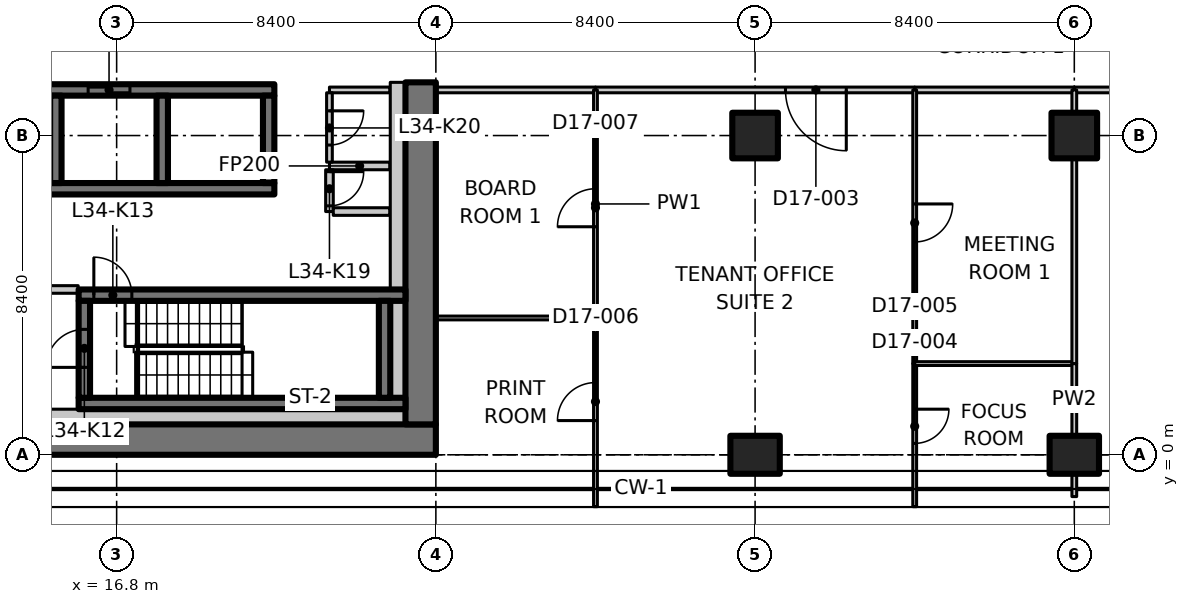
"""IFC4 building model, lengths in metres.
Left out: names, types, materials, properties, quantities, classifications, styles, units other than length and angle.
Written with IfcOpenShell. Run it as: python <this file> out.ifc"""

import sys

from ifc_helpers import new_model, si_unit, direction, frame, frame_2d, origin, origin_2d, place, context, subcontext, project, spatial, polyline, rectangle, outline, extrude, element, fill, save


model = new_model("IFC4")
c1 = context("Model", 3, precision=1e-05, world=origin(), true_north=direction((0.0, 1.0)))
c2 = subcontext(c1, "Body", "Model", "MODEL_VIEW")
j1 = project(units=[si_unit("LENGTHUNIT", "METRE"), si_unit("PLANEANGLEUNIT", "RADIAN")], contexts=[c1])
p1 = place(None, origin())
s1 = spatial("IfcSite", under=j1, at=p1, CompositionType="ELEMENT")
p2 = place(p1, origin())
s2 = spatial("IfcBuilding", under=s1, at=p2, CompositionType="ELEMENT")
p3 = place(p2, frame((0.0, 0.0, 138.5)))
s3 = spatial("IfcBuildingStorey", under=s2, at=p3, CompositionType="ELEMENT", Elevation=138.5)
p4 = place(p3, frame((33.6, 0.0, 0.0), z_axis=(0.0, 0.0, 1.0), x_axis=(0.0, 1.0, 0.0)))
e1 = element("IfcColumn", 1, at=p4, inside=s3, PredefinedType="COLUMN", context=c2, shape_type="SweptSolid", body=[
    extrude(rectangle(XDim=1.0, YDim=1.3, at=origin_2d()), origin(), (0.0, 0.0, 1.0), 3.35),
])
p5 = place(p3, frame((33.6, 8.4, 0.0), z_axis=(0.0, 0.0, 1.0), x_axis=(1.0, 0.0, 0.0)))
e2 = element("IfcColumn", 2, at=p5, inside=s3, PredefinedType="COLUMN", context=c2, shape_type="SweptSolid", body=[
    extrude(rectangle(XDim=1.2, YDim=1.2, at=origin_2d()), origin(), (0.0, 0.0, 1.0), 3.35),
])
p6 = place(p3, frame((42.0, 0.0, 0.0), z_axis=(0.0, 0.0, 1.0), x_axis=(0.0, 1.0, 0.0)))
e3 = element("IfcColumn", 3, at=p6, inside=s3, PredefinedType="COLUMN", context=c2, shape_type="SweptSolid", body=[
    extrude(rectangle(XDim=1.0, YDim=1.3, at=origin_2d()), origin(), (0.0, 0.0, 1.0), 3.35),
])
p7 = place(p3, frame((42.0, 8.4, 0.0), z_axis=(0.0, 0.0, 1.0), x_axis=(1.0, 0.0, 0.0)))
e4 = element("IfcColumn", 4, at=p7, inside=s3, PredefinedType="COLUMN", context=c2, shape_type="SweptSolid", body=[
    extrude(rectangle(XDim=1.2, YDim=1.2, at=origin_2d()), origin(), (0.0, 0.0, 1.0), 3.35),
])
p8 = place(p3, frame((7.136, 0.4, 0.0), z_axis=(0.0, 0.0, 1.0), x_axis=(1.0, 0.0, 0.0)))
e5 = element("IfcWall", 5, at=p8, inside=s3, PredefinedType="SHEAR", context=c2, shape_type="SweptSolid", body=[
    extrude(rectangle(XDim=18.063, YDim=0.8, at=frame_2d((9.032, 0.0))), origin(), (0.0, 0.0, 1.0), 3.35),
])
p9 = place(p3, frame((24.8, 0.8, 0.0), z_axis=(0.0, 0.0, 1.0), x_axis=(0.0, 1.0, 0.0)))
e6 = element("IfcWall", 6, at=p9, inside=s3, PredefinedType="SHEAR", context=c2, shape_type="SweptSolid", body=[
    extrude(rectangle(XDim=9.0, YDim=0.8, at=frame_2d((4.5, 0.0))), origin(), (0.0, 0.0, 1.0), 3.35),
])
p10 = place(p3, frame((0.8, 7.0, 0.0), z_axis=(0.0, 0.0, 1.0), x_axis=(1.0, 0.0, 0.0)))
e7 = element("IfcWall", 7, at=p10, inside=s3, PredefinedType="SHEAR", context=c2, shape_type="SweptSolid", body=[
    extrude(rectangle(XDim=20.15, YDim=0.3, at=frame_2d((10.075, 0.0))), origin(), (0.0, 0.0, 1.0), 3.35),
])
p11 = place(p3, frame((0.8, 9.6, 0.0), z_axis=(0.0, 0.0, 1.0), x_axis=(1.0, 0.0, 0.0)))
e8 = element("IfcWall", 8, at=p11, inside=s3, PredefinedType="SHEAR", context=c2, shape_type="SweptSolid", body=[
    extrude(rectangle(XDim=20.15, YDim=0.3, at=frame_2d((10.075, 0.0))), origin(), (0.0, 0.0, 1.0), 3.35),
])
p12 = place(p11, frame((1.25, 0.0, 0.0)))
e9 = element("IfcOpeningElement", 9, at=p12, cuts=e8, PredefinedType="OPENING", context=c2, shape_type="SweptSolid", body=[
    extrude(rectangle(XDim=1.1, YDim=2.3, at=frame_2d((0.55, 1.15))), frame((0.0, 0.16, 0.0), z_axis=(0.0, -1.0, 0.0), x_axis=(1.0, 0.0, 0.0)), (0.0, 0.0, 1.0), 0.32),
])
p13 = place(p11, frame((4.05, 0.0, 0.0)))
e10 = element("IfcOpeningElement", 10, at=p13, cuts=e8, PredefinedType="OPENING", context=c2, shape_type="SweptSolid", body=[
    extrude(rectangle(XDim=1.1, YDim=2.3, at=frame_2d((0.55, 1.15))), frame((0.0, 0.16, 0.0), z_axis=(0.0, -1.0, 0.0), x_axis=(1.0, 0.0, 0.0)), (0.0, 0.0, 1.0), 0.32),
])
p14 = place(p11, frame((6.85, 0.0, 0.0)))
e11 = element("IfcOpeningElement", 11, at=p14, cuts=e8, PredefinedType="OPENING", context=c2, shape_type="SweptSolid", body=[
    extrude(rectangle(XDim=1.1, YDim=2.3, at=frame_2d((0.55, 1.15))), frame((0.0, 0.16, 0.0), z_axis=(0.0, -1.0, 0.0), x_axis=(1.0, 0.0, 0.0)), (0.0, 0.0, 1.0), 0.32),
])
p15 = place(p11, frame((9.65, 0.0, 0.0)))
e12 = element("IfcOpeningElement", 12, at=p15, cuts=e8, PredefinedType="OPENING", context=c2, shape_type="SweptSolid", body=[
    extrude(rectangle(XDim=1.1, YDim=2.3, at=frame_2d((0.55, 1.15))), frame((0.0, 0.16, 0.0), z_axis=(0.0, -1.0, 0.0), x_axis=(1.0, 0.0, 0.0)), (0.0, 0.0, 1.0), 0.32),
])
p16 = place(p11, frame((12.45, 0.0, 0.0)))
e13 = element("IfcOpeningElement", 13, at=p16, cuts=e8, PredefinedType="OPENING", context=c2, shape_type="SweptSolid", body=[
    extrude(rectangle(XDim=1.1, YDim=2.3, at=frame_2d((0.55, 1.15))), frame((0.0, 0.16, 0.0), z_axis=(0.0, -1.0, 0.0), x_axis=(1.0, 0.0, 0.0)), (0.0, 0.0, 1.0), 0.32),
])
p17 = place(p11, frame((15.25, 0.0, 0.0)))
e14 = element("IfcOpeningElement", 14, at=p17, cuts=e8, PredefinedType="OPENING", context=c2, shape_type="SweptSolid", body=[
    extrude(rectangle(XDim=1.1, YDim=2.3, at=frame_2d((0.55, 1.15))), frame((0.0, 0.16, 0.0), z_axis=(0.0, -1.0, 0.0), x_axis=(1.0, 0.0, 0.0)), (0.0, 0.0, 1.0), 0.32),
])
for number, where, z_axis, x_axis in (
    (15, (15.2, 7.15, 0.0), (0.0, 0.0, 1.0), (0.0, 1.0, 0.0)),
    (16, (18.0, 7.15, 0.0), (0.0, 0.0, 1.0), (0.0, 1.0, 0.0)),
    (17, (20.8, 7.15, 0.0), (0.0, 0.0, 1.0), (0.0, 1.0, 0.0)),
):
    element("IfcWall", number, at=place(p3, frame(where, z_axis=z_axis, x_axis=x_axis)), inside=s3, PredefinedType="SHEAR", context=c2, shape_type="SweptSolid", body=[
        extrude(rectangle(XDim=2.3, YDim=0.3, at=frame_2d((1.15, 0.0))), origin(), (0.0, 0.0, 1.0), 3.35),
    ])
p18 = place(p3, frame((15.8, 1.35, 0.0), z_axis=(0.0, 0.0, 1.0), x_axis=(1.0, 0.0, 0.0)))
e18 = element("IfcWall", 18, at=p18, inside=s3, PredefinedType="SHEAR", context=c2, shape_type="SweptSolid", body=[
    extrude(rectangle(XDim=8.6, YDim=0.3, at=frame_2d((4.3, 0.0))), origin(), (0.0, 0.0, 1.0), 3.35),
])
p19 = place(p3, frame((15.8, 4.2, 0.0), z_axis=(0.0, 0.0, 1.0), x_axis=(1.0, 0.0, 0.0)))
e19 = element("IfcWall", 19, at=p19, inside=s3, PredefinedType="SHEAR", context=c2, shape_type="SweptSolid", body=[
    extrude(rectangle(XDim=8.6, YDim=0.3, at=frame_2d((4.3, 0.0))), origin(), (0.0, 0.0, 1.0), 3.35),
])
p20 = place(p19, frame((0.4, 0.0, 0.0)))
e20 = element("IfcOpeningElement", 20, at=p20, cuts=e19, PredefinedType="OPENING", context=c2, shape_type="SweptSolid", body=[
    extrude(rectangle(XDim=1.0, YDim=2.1, at=frame_2d((0.5, 1.05))), frame((0.0, 0.16, 0.0), z_axis=(0.0, -1.0, 0.0), x_axis=(1.0, 0.0, 0.0)), (0.0, 0.0, 1.0), 0.32),
])
p21 = place(p3, frame((15.95, 1.5, 0.0), z_axis=(0.0, 0.0, 1.0), x_axis=(0.0, 1.0, 0.0)))
e21 = element("IfcWall", 21, at=p21, inside=s3, PredefinedType="SHEAR", context=c2, shape_type="SweptSolid", body=[
    extrude(rectangle(XDim=2.55, YDim=0.3, at=frame_2d((1.275, 0.0))), origin(), (0.0, 0.0, 1.0), 3.35),
])
p22 = place(p21, frame((0.8, 0.0, 0.0)))
e22 = element("IfcOpeningElement", 22, at=p22, cuts=e21, PredefinedType="OPENING", context=c2, shape_type="SweptSolid", body=[
    extrude(rectangle(XDim=1.0, YDim=2.1, at=frame_2d((0.5, 1.05))), frame((0.0, 0.16, 0.0), z_axis=(0.0, -1.0, 0.0), x_axis=(1.0, 0.0, 0.0)), (0.0, 0.0, 1.0), 0.32),
])
p23 = place(p3, frame((23.85, 1.5, 0.0), z_axis=(0.0, 0.0, 1.0), x_axis=(0.0, 1.0, 0.0)))
e23 = element("IfcWall", 23, at=p23, inside=s3, PredefinedType="SHEAR", context=c2, shape_type="SweptSolid", body=[
    extrude(rectangle(XDim=2.55, YDim=0.3, at=frame_2d((1.275, 0.0))), origin(), (0.0, 0.0, 1.0), 3.35),
])
p24 = place(p3, frame((13.362, 4.35, 0.0), z_axis=(0.0, 0.0, 1.0), x_axis=(1.0, 0.0, 0.0)))
e24 = element("IfcWall", 24, at=p24, inside=s3, PredefinedType="PARTITIONING", context=c2, shape_type="SweptSolid", body=[
    extrude(rectangle(XDim=2.426, YDim=0.2, at=frame_2d((1.213, 0.0))), origin(), (0.0, 0.0, 1.0), 3.35),
])
p25 = place(p24, frame((0.638, 0.0, 0.0)))
e25 = element("IfcOpeningElement", 25, at=p25, cuts=e24, PredefinedType="OPENING", context=c2, shape_type="SweptSolid", body=[
    extrude(rectangle(XDim=1.0, YDim=2.1, at=frame_2d((0.5, 1.05))), frame((0.0, 0.11, 0.0), z_axis=(0.0, -1.0, 0.0), x_axis=(1.0, 0.0, 0.0)), (0.0, 0.0, 1.0), 0.22),
])
p26 = place(p3, frame((23.988, 7.6, 0.0), z_axis=(0.0, 0.0, 1.0), x_axis=(-1.0, 0.0, 0.0)))
e26 = element("IfcWall", 26, at=p26, inside=s3, PredefinedType="PARTITIONING", context=c2, shape_type="SweptSolid", body=[
    extrude(rectangle(XDim=1.588, YDim=0.2, at=frame_2d((0.794, 0.0))), origin(), (0.0, 0.0, 1.0), 3.35),
])
p27 = place(p3, frame((22.4, 7.5, 0.0), z_axis=(0.0, 0.0, 1.0), x_axis=(0.0, -1.0, 0.0)))
e27 = element("IfcWall", 27, at=p27, inside=s3, PredefinedType="PARTITIONING", context=c2, shape_type="SweptSolid", body=[
    extrude(rectangle(XDim=1.1, YDim=0.2, at=frame_2d((0.55, 0.0))), origin(), (0.0, 0.0, 1.0), 3.35),
])
p28 = place(p27, frame((0.05, 0.0, 0.0)))
e28 = element("IfcOpeningElement", 28, at=p28, cuts=e27, PredefinedType="OPENING", context=c2, shape_type="SweptSolid", body=[
    extrude(rectangle(XDim=0.9, YDim=2.1, at=frame_2d((0.45, 1.05))), frame((0.0, 0.11, 0.0), z_axis=(0.0, -1.0, 0.0), x_axis=(1.0, 0.0, 0.0)), (0.0, 0.0, 1.0), 0.22),
])
p29 = place(p3, frame((22.5, 6.4, 0.0), z_axis=(0.0, 0.0, 1.0), x_axis=(1.0, 0.0, 0.0)))
e29 = element("IfcWall", 29, at=p29, inside=s3, PredefinedType="PARTITIONING", context=c2, shape_type="SweptSolid", body=[
    extrude(rectangle(XDim=1.488, YDim=0.2, at=frame_2d((0.744, 0.0))), origin(), (0.0, 0.0, 1.0), 3.35),
])
p30 = place(p3, frame((23.988, 9.6, 0.0), z_axis=(0.0, 0.0, 1.0), x_axis=(-1.0, 0.0, 0.0)))
e30 = element("IfcWall", 30, at=p30, inside=s3, PredefinedType="PARTITIONING", context=c2, shape_type="SweptSolid", body=[
    extrude(rectangle(XDim=1.588, YDim=0.15, at=frame_2d((0.794, 0.0))), origin(), (0.0, 0.0, 1.0), 3.35),
])
p31 = place(p3, frame((22.4, 9.525, 0.0), z_axis=(0.0, 0.0, 1.0), x_axis=(0.0, -1.0, 0.0)))
e31 = element("IfcWall", 31, at=p31, inside=s3, PredefinedType="PARTITIONING", context=c2, shape_type="SweptSolid", body=[
    extrude(rectangle(XDim=1.825, YDim=0.15, at=frame_2d((0.913, 0.0))), origin(), (0.0, 0.0, 1.0), 3.35),
])
p32 = place(p31, frame((0.475, 0.0, 0.0)))
e32 = element("IfcOpeningElement", 32, at=p32, cuts=e31, PredefinedType="OPENING", context=c2, shape_type="SweptSolid", body=[
    extrude(rectangle(XDim=0.9, YDim=2.1, at=frame_2d((0.45, 1.05))), frame((0.0, 0.085, 0.0), z_axis=(0.0, -1.0, 0.0), x_axis=(1.0, 0.0, 0.0)), (0.0, 0.0, 1.0), 0.17),
])
p33 = place(p3, frame((13.35, 1.0, 0.0), z_axis=(0.0, 0.0, 1.0), x_axis=(1.0, 0.0, 0.0)))
e33 = element("IfcWall", 33, at=p33, inside=s3, PredefinedType="PARTITIONING", context=c2, shape_type="SweptSolid", body=[
    extrude(rectangle(XDim=11.05, YDim=0.4, at=frame_2d((5.525, 0.0))), origin(), (0.0, 0.0, 1.0), 3.35),
])
p34 = place(p3, frame((24.2, 1.5, 0.0), z_axis=(0.0, 0.0, 1.0), x_axis=(0.0, 1.0, 0.0)))
e34 = element("IfcWall", 34, at=p34, inside=s3, PredefinedType="PARTITIONING", context=c2, shape_type="SweptSolid", body=[
    extrude(rectangle(XDim=2.55, YDim=0.4, at=frame_2d((1.275, 0.0))), origin(), (0.0, 0.0, 1.0), 3.35),
])
p35 = place(p3, frame((24.2, 4.35, 0.0), z_axis=(0.0, 0.0, 1.0), x_axis=(0.0, 1.0, 0.0)))
e35 = element("IfcWall", 35, at=p35, inside=s3, PredefinedType="PARTITIONING", context=c2, shape_type="SweptSolid", body=[
    extrude(rectangle(XDim=5.45, YDim=0.4, at=frame_2d((2.725, 0.0))), origin(), (0.0, 0.0, 1.0), 3.35),
])
p36 = place(p3, frame((29.4, 9.6, 0.0), z_axis=(0.0, 0.0, 1.0), x_axis=(-1.0, 0.0, 0.0)))
e36 = element("IfcWall", 36, at=p36, inside=s3, PredefinedType="PARTITIONING", context=c2, shape_type="SweptSolid", body=[
    extrude(rectangle(XDim=4.2, YDim=0.15, at=frame_2d((2.1, 0.0))), origin(), (0.0, 0.0, 1.0), 3.33),
])
p37 = place(p3, frame((37.8, 9.6, 0.0), z_axis=(0.0, 0.0, 1.0), x_axis=(-1.0, 0.0, 0.0)))
e37 = element("IfcWall", 37, at=p37, inside=s3, PredefinedType="PARTITIONING", context=c2, shape_type="SweptSolid", body=[
    extrude(rectangle(XDim=8.4, YDim=0.15, at=frame_2d((4.2, 0.0))), origin(), (0.0, 0.0, 1.0), 3.33),
])
p38 = place(p37, frame((1.8, 0.0, 0.0)))
e38 = element("IfcOpeningElement", 38, at=p38, cuts=e37, PredefinedType="OPENING", context=c2, shape_type="SweptSolid", body=[
    extrude(rectangle(XDim=1.6, YDim=2.1, at=frame_2d((0.8, 1.05))), frame((0.0, 0.085, 0.0), z_axis=(0.0, -1.0, 0.0), x_axis=(1.0, 0.0, 0.0)), (0.0, 0.0, 1.0), 0.17),
])
p39 = place(p3, frame((42.0, 9.6, 0.0), z_axis=(0.0, 0.0, 1.0), x_axis=(-1.0, 0.0, 0.0)))
e39 = element("IfcWall", 39, at=p39, inside=s3, PredefinedType="PARTITIONING", context=c2, shape_type="SweptSolid", body=[
    extrude(rectangle(XDim=4.2, YDim=0.15, at=frame_2d((2.1, 0.0))), origin(), (0.0, 0.0, 1.0), 3.33),
])
p40 = place(p3, frame((50.4, 9.6, 0.0), z_axis=(0.0, 0.0, 1.0), x_axis=(-1.0, 0.0, 0.0)))
e40 = element("IfcWall", 40, at=p40, inside=s3, PredefinedType="PARTITIONING", context=c2, shape_type="SweptSolid", body=[
    extrude(rectangle(XDim=8.4, YDim=0.15, at=frame_2d((4.2, 0.0))), origin(), (0.0, 0.0, 1.0), 3.33),
])
p41 = place(p40, frame((3.3, 0.0, 0.0)))
e41 = element("IfcOpeningElement", 41, at=p41, cuts=e40, PredefinedType="OPENING", context=c2, shape_type="SweptSolid", body=[
    extrude(rectangle(XDim=1.6, YDim=2.1, at=frame_2d((0.8, 1.05))), frame((0.0, 0.085, 0.0), z_axis=(0.0, -1.0, 0.0), x_axis=(1.0, 0.0, 0.0)), (0.0, 0.0, 1.0), 0.17),
])
p42 = place(p3, frame((37.8, 2.4, 0.0), z_axis=(0.0, 0.0, 1.0), x_axis=(0.0, -1.0, 0.0)))
e42 = element("IfcWall", 42, at=p42, inside=s3, PredefinedType="PARTITIONING", context=c2, shape_type="SweptSolid", body=[
    extrude(rectangle(XDim=3.765, YDim=0.1, at=frame_2d((1.882, 0.0))), origin(), (0.0, 0.0, 1.0), 2.98),
])
p43 = place(p42, frame((1.2, 0.0, 0.0)))
e43 = element("IfcOpeningElement", 43, at=p43, cuts=e42, PredefinedType="OPENING", context=c2, shape_type="SweptSolid", body=[
    extrude(rectangle(XDim=0.9, YDim=2.1, at=frame_2d((0.45, 1.05))), frame((0.0, 0.06, 0.0), z_axis=(0.0, -1.0, 0.0), x_axis=(1.0, 0.0, 0.0)), (0.0, 0.0, 1.0), 0.12),
])
p44 = place(p3, frame((37.8, 9.6, 0.0), z_axis=(0.0, 0.0, 1.0), x_axis=(0.0, -1.0, 0.0)))
e44 = element("IfcWall", 44, at=p44, inside=s3, PredefinedType="PARTITIONING", context=c2, shape_type="SweptSolid", body=[
    extrude(rectangle(XDim=7.2, YDim=0.1, at=frame_2d((3.6, 0.0))), origin(), (0.0, 0.0, 1.0), 3.33),
])
p45 = place(p44, frame((3.0, 0.0, 0.0)))
e45 = element("IfcOpeningElement", 45, at=p45, cuts=e44, PredefinedType="OPENING", context=c2, shape_type="SweptSolid", body=[
    extrude(rectangle(XDim=1.0, YDim=2.1, at=frame_2d((0.5, 1.05))), frame((0.0, 0.06, 0.0), z_axis=(0.0, -1.0, 0.0), x_axis=(1.0, 0.0, 0.0)), (0.0, 0.0, 1.0), 0.12),
])
p46 = place(p3, frame((29.4, -1.365, 0.0), z_axis=(0.0, 0.0, 1.0), x_axis=(0.0, 1.0, 0.0)))
e46 = element("IfcWall", 46, at=p46, inside=s3, PredefinedType="PARTITIONING", context=c2, shape_type="SweptSolid", body=[
    extrude(outline(polyline([(0.0, 0.0), (4.965, 0.0), (4.965, 3.33), (1.815, 3.33), (1.813, 2.98), (0.917, 2.98), (0.915, 3.33), (0.265, 3.33), (0.0, 3.33), (0.0, 0.0)])), frame((0.0, 0.05, 0.0), z_axis=(0.0, -1.0, 0.0), x_axis=(1.0, 0.0, 0.0)), (0.0, 0.0, 1.0), 0.1),
])
p47 = place(p46, frame((2.265, 0.0, 0.0)))
e47 = element("IfcOpeningElement", 47, at=p47, cuts=e46, PredefinedType="OPENING", context=c2, shape_type="SweptSolid", body=[
    extrude(rectangle(XDim=1.0, YDim=2.1, at=frame_2d((0.5, 1.05))), frame((0.0, 0.06, 0.0), z_axis=(0.0, -1.0, 0.0), x_axis=(1.0, 0.0, 0.0)), (0.0, 0.0, 1.0), 0.12),
])
p48 = place(p3, frame((29.4, 3.6, 0.0), z_axis=(0.0, 0.0, 1.0), x_axis=(0.0, 1.0, 0.0)))
e48 = element("IfcWall", 48, at=p48, inside=s3, PredefinedType="PARTITIONING", context=c2, shape_type="SweptSolid", body=[
    extrude(rectangle(XDim=6.0, YDim=0.1, at=frame_2d((3.0, 0.0))), origin(), (0.0, 0.0, 1.0), 3.33),
])
p49 = place(p48, frame((2.4, 0.0, 0.0)))
e49 = element("IfcOpeningElement", 49, at=p49, cuts=e48, PredefinedType="OPENING", context=c2, shape_type="SweptSolid", body=[
    extrude(rectangle(XDim=1.0, YDim=2.1, at=frame_2d((0.5, 1.05))), frame((0.0, 0.06, 0.0), z_axis=(0.0, -1.0, 0.0), x_axis=(1.0, 0.0, 0.0)), (0.0, 0.0, 1.0), 0.12),
])
p50 = place(p3, frame((37.8, 2.4, 0.0), z_axis=(0.0, 0.0, 1.0), x_axis=(1.0, 0.0, 0.0)))
e50 = element("IfcWall", 50, at=p50, inside=s3, PredefinedType="PARTITIONING", context=c2, shape_type="SweptSolid", body=[
    extrude(rectangle(XDim=4.2, YDim=0.1, at=frame_2d((2.1, 0.0))), origin(), (0.0, 0.0, 1.0), 3.33),
])
p51 = place(p3, frame((42.0, 2.4, 0.0), z_axis=(0.0, 0.0, 1.0), x_axis=(0.0, -1.0, 0.0)))
e51 = element("IfcWall", 51, at=p51, inside=s3, PredefinedType="PARTITIONING", context=c2, shape_type="SweptSolid", body=[
    extrude(rectangle(XDim=1.88, YDim=0.125, at=frame_2d((0.94, 0.0))), origin(), (0.0, 0.0, 1.0), 3.33),
])
for number, where, z_axis, x_axis in (
    (52, (42.0, -0.52, 0.0), (0.0, 0.0, 1.0), (0.0, -1.0, 0.0)),
    (53, (42.0, 9.6, 0.0), (0.0, 0.0, 1.0), (0.0, -1.0, 0.0)),
):
    element("IfcWall", number, at=place(p3, frame(where, z_axis=z_axis, x_axis=x_axis)), inside=s3, PredefinedType="PARTITIONING", context=c2, shape_type="SweptSolid", body=[
        extrude(rectangle(XDim=0.58, YDim=0.125, at=frame_2d((0.29, 0.0))), origin(), (0.0, 0.0, 1.0), 3.33),
    ])
p52 = place(p3, frame((42.0, 7.78, 0.0), z_axis=(0.0, 0.0, 1.0), x_axis=(0.0, -1.0, 0.0)))
e54 = element("IfcWall", 54, at=p52, inside=s3, PredefinedType="PARTITIONING", context=c2, shape_type="SweptSolid", body=[
    extrude(rectangle(XDim=5.38, YDim=0.125, at=frame_2d((2.69, 0.0))), origin(), (0.0, 0.0, 1.0), 3.33),
])
p53 = place(p3, frame((25.2, 3.6, 0.0), z_axis=(0.0, 0.0, 1.0), x_axis=(1.0, 0.0, 0.0)))
e55 = element("IfcWall", 55, at=p53, inside=s3, PredefinedType="PARTITIONING", context=c2, shape_type="SweptSolid", body=[
    extrude(rectangle(XDim=4.2, YDim=0.1, at=frame_2d((2.1, 0.0))), origin(), (0.0, 0.0, 1.0), 3.33),
])
p54 = place(p17, origin())
e56 = element("IfcDoor", 56, at=p54, inside=s3, OperationType="SLIDING_TO_LEFT", PredefinedType="DOOR", context=c2, shape_type="SweptSolid", body=[
    extrude(rectangle(XDim=1.1, YDim=2.3, at=frame_2d((0.55, 1.15))), frame((0.0, 0.025, 0.0), z_axis=(0.0, -1.0, 0.0), x_axis=(1.0, 0.0, 0.0)), (0.0, 0.0, 1.0), 0.05),
])
fill(e14, e56)
p55 = place(p22, origin())
e57 = element("IfcDoor", 57, at=p55, inside=s3, OperationType="SINGLE_SWING_RIGHT", PredefinedType="DOOR", context=c2, shape_type="SweptSolid", body=[
    extrude(rectangle(XDim=1.0, YDim=2.1, at=frame_2d((0.5, 1.05))), frame((0.0, 0.025, 0.0), z_axis=(0.0, -1.0, 0.0), x_axis=(1.0, 0.0, 0.0)), (0.0, 0.0, 1.0), 0.05),
])
fill(e22, e57)
p56 = place(p20, origin())
e58 = element("IfcDoor", 58, at=p56, inside=s3, OperationType="SINGLE_SWING_LEFT", PredefinedType="DOOR", context=c2, shape_type="SweptSolid", body=[
    extrude(rectangle(XDim=1.0, YDim=2.1, at=frame_2d((0.5, 1.05))), frame((0.0, 0.025, 0.0), z_axis=(0.0, -1.0, 0.0), x_axis=(1.0, 0.0, 0.0)), (0.0, 0.0, 1.0), 0.05),
])
fill(e20, e58)
p57 = place(p28, origin())
e59 = element("IfcDoor", 59, at=p57, inside=s3, OperationType="SINGLE_SWING_LEFT", PredefinedType="DOOR", context=c2, shape_type="SweptSolid", body=[
    extrude(rectangle(XDim=0.9, YDim=2.1, at=frame_2d((0.45, 1.05))), frame((0.0, 0.025, 0.0), z_axis=(0.0, -1.0, 0.0), x_axis=(1.0, 0.0, 0.0)), (0.0, 0.0, 1.0), 0.05),
])
fill(e28, e59)
p58 = place(p32, origin())
e60 = element("IfcDoor", 60, at=p58, inside=s3, OperationType="SINGLE_SWING_RIGHT", PredefinedType="DOOR", context=c2, shape_type="SweptSolid", body=[
    extrude(rectangle(XDim=0.9, YDim=2.1, at=frame_2d((0.45, 1.05))), frame((0.0, 0.025, 0.0), z_axis=(0.0, -1.0, 0.0), x_axis=(1.0, 0.0, 0.0)), (0.0, 0.0, 1.0), 0.05),
])
fill(e32, e60)
p59 = place(p38, origin())
e61 = element("IfcDoor", 61, at=p59, inside=s3, OperationType="DOUBLE_DOOR_SINGLE_SWING", PredefinedType="DOOR", context=c2, shape_type="SweptSolid", body=[
    extrude(rectangle(XDim=1.6, YDim=2.1, at=frame_2d((0.8, 1.05))), frame((0.0, 0.025, 0.0), z_axis=(0.0, -1.0, 0.0), x_axis=(1.0, 0.0, 0.0)), (0.0, 0.0, 1.0), 0.05),
])
fill(e38, e61)
p60 = place(p43, origin())
e62 = element("IfcDoor", 62, at=p60, inside=s3, OperationType="SINGLE_SWING_LEFT", PredefinedType="DOOR", context=c2, shape_type="SweptSolid", body=[
    extrude(rectangle(XDim=0.9, YDim=2.1, at=frame_2d((0.45, 1.05))), frame((0.0, 0.025, 0.0), z_axis=(0.0, -1.0, 0.0), x_axis=(1.0, 0.0, 0.0)), (0.0, 0.0, 1.0), 0.05),
])
fill(e43, e62)
p61 = place(p45, origin())
e63 = element("IfcDoor", 63, at=p61, inside=s3, OperationType="SINGLE_SWING_LEFT", PredefinedType="DOOR", context=c2, shape_type="SweptSolid", body=[
    extrude(rectangle(XDim=1.0, YDim=2.1, at=frame_2d((0.5, 1.05))), frame((0.0, 0.025, 0.0), z_axis=(0.0, -1.0, 0.0), x_axis=(1.0, 0.0, 0.0)), (0.0, 0.0, 1.0), 0.05),
])
fill(e45, e63)
p62 = place(p47, origin())
e64 = element("IfcDoor", 64, at=p62, inside=s3, OperationType="SINGLE_SWING_LEFT", PredefinedType="DOOR", context=c2, shape_type="SweptSolid", body=[
    extrude(rectangle(XDim=1.0, YDim=2.1, at=frame_2d((0.5, 1.05))), frame((0.0, 0.025, 0.0), z_axis=(0.0, -1.0, 0.0), x_axis=(1.0, 0.0, 0.0)), (0.0, 0.0, 1.0), 0.05),
])
fill(e47, e64)
p63 = place(p49, origin())
e65 = element("IfcDoor", 65, at=p63, inside=s3, OperationType="SINGLE_SWING_LEFT", PredefinedType="DOOR", context=c2, shape_type="SweptSolid", body=[
    extrude(rectangle(XDim=1.0, YDim=2.1, at=frame_2d((0.5, 1.05))), frame((0.0, 0.025, 0.0), z_axis=(0.0, -1.0, 0.0), x_axis=(1.0, 0.0, 0.0)), (0.0, 0.0, 1.0), 0.05),
])
fill(e49, e65)
save(model, sys.argv[1])
